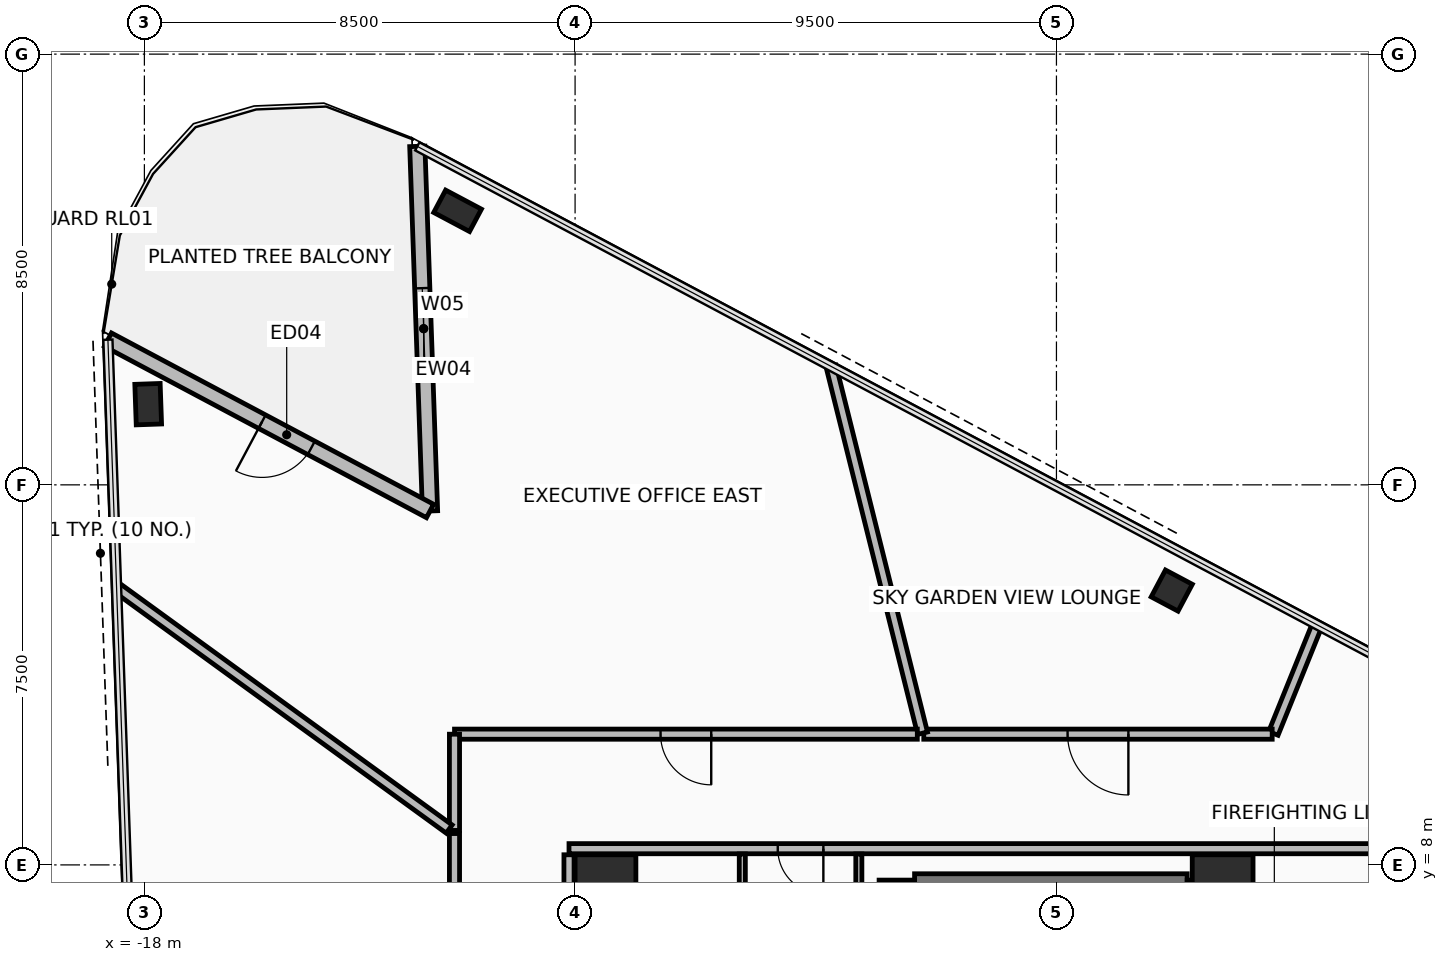
"""IFC4 building model, lengths in metres.
Left out: names, types, materials, properties, quantities, classifications, styles, units other than length and angle.
Written with IfcOpenShell. Run it as: python <this file> out.ifc"""

import sys

from ifc_helpers import new_model, si_unit, direction, frame, frame_2d, origin, origin_2d, place, context, subcontext, project, spatial, rectangle, hollow_rectangle, extrude, element, fill, save


model = new_model("IFC4")
c1 = context("Model", 3, precision=1e-05, world=origin(), true_north=direction((0.0, 1.0)))
c2 = subcontext(c1, "Body", "Model", "MODEL_VIEW")
j1 = project(units=[si_unit("LENGTHUNIT", "METRE"), si_unit("PLANEANGLEUNIT", "RADIAN")], contexts=[c1])
p1 = place(None, origin())
s1 = spatial("IfcSite", under=j1, at=p1, CompositionType="ELEMENT")
p2 = place(p1, origin())
s2 = spatial("IfcBuilding", under=s1, at=p2, CompositionType="ELEMENT")
p3 = place(p2, frame((0.0, 0.0, 138.8)))
s3 = spatial("IfcBuildingStorey", under=s2, at=p3, CompositionType="ELEMENT", Elevation=138.8)
for number, where, z_axis, x_axis in (
    (1, (3.28, 7.6, 0.0), (0.0, 0.0, 1.0), (1.0, 0.0, 0.0)),
    (2, (-8.9, 7.6, 0.0), (0.0, 0.0, 1.0), (1.0, 0.0, 0.0)),
):
    element("IfcColumn", number, at=place(p3, frame(where, z_axis=z_axis, x_axis=x_axis)), inside=s3, PredefinedType="COLUMN", context=c2, shape_type="SweptSolid", body=[
        extrude(rectangle(XDim=1.2, YDim=1.2, at=origin_2d()), origin(), (0.0, 0.0, 1.0), 3.6),
    ])
p4 = place(p3, frame((-17.925, 17.092, -0.19), z_axis=(0.0, 0.0, 1.0), x_axis=(-0.034899496703, 0.999390827019, 0.0)))
e3 = element("IfcColumn", 3, at=p4, inside=s3, PredefinedType="COLUMN", context=c2, shape_type="SweptSolid", body=[
    extrude(hollow_rectangle(XDim=0.5, YDim=0.8, WallThickness=0.04, at=origin_2d()), origin(), (0.0, 0.0, 1.0), 3.79),
])
p5 = place(p3, frame((2.276, 13.414, 0.0), z_axis=(0.0, 0.0, 1.0), x_axis=(-0.88294841224, 0.469470021751, 0.0)))
e4 = element("IfcColumn", 4, at=p5, inside=s3, PredefinedType="COLUMN", context=c2, shape_type="SweptSolid", body=[
    extrude(hollow_rectangle(XDim=0.6, YDim=0.6, WallThickness=0.036, at=origin_2d()), origin(), (0.0, 0.0, 1.0), 3.6),
])
p6 = place(p3, frame((-11.819, 20.908, 0.0), z_axis=(0.0, 0.0, 1.0), x_axis=(-0.88294841224, 0.469470021751, 0.0)))
e5 = element("IfcColumn", 5, at=p6, inside=s3, PredefinedType="COLUMN", context=c2, shape_type="SweptSolid", body=[
    extrude(hollow_rectangle(XDim=0.5, YDim=0.8, WallThickness=0.04, at=origin_2d()), origin(), (0.0, 0.0, 1.0), 3.6),
])
p7 = place(p3, frame((-12.614, 22.18, 0.0), z_axis=(0.0, 0.0, 1.0), x_axis=(0.034925918675, -0.999389903994, 0.0)))
e6 = element("IfcWall", 6, at=p7, inside=s3, PredefinedType="STANDARD", context=c2, shape_type="SweptSolid", body=[
    extrude(rectangle(XDim=7.2, YDim=0.3, at=frame_2d((3.6, 0.0))), origin(), (0.0, 0.0, 1.0), 2.705),
])
p8 = place(p7, frame((2.8, 0.0, 0.325)))
e7 = element("IfcOpeningElement", 7, at=p8, cuts=e6, PredefinedType="OPENING", context=c2, shape_type="SweptSolid", body=[
    extrude(rectangle(XDim=1.6, YDim=2.2, at=frame_2d((0.8, 1.1))), frame((0.0, 0.16, 0.0), z_axis=(0.0, -1.0, 0.0), x_axis=(1.0, 0.0, 0.0)), (0.0, 0.0, 1.0), 0.32),
])
p9 = place(p3, frame((-12.363, 14.984, 0.0), z_axis=(0.0, 0.0, 1.0), x_axis=(-0.882950149473, 0.469466754463, 0.0)))
e8 = element("IfcWall", 8, at=p9, inside=s3, PredefinedType="STANDARD", context=c2, shape_type="SweptSolid", body=[
    extrude(rectangle(XDim=7.2, YDim=0.3, at=frame_2d((3.6, 0.0))), origin(), (0.0, 0.0, 1.0), 2.705),
])
p10 = place(p9, frame((2.654, 0.0, 0.0)))
e9 = element("IfcOpeningElement", 9, at=p10, cuts=e8, PredefinedType="OPENING", context=c2, shape_type="SweptSolid", body=[
    extrude(rectangle(XDim=1.1, YDim=2.2, at=frame_2d((0.55, 1.1))), frame((0.0, 0.16, 0.0), z_axis=(0.0, -1.0, 0.0), x_axis=(1.0, 0.0, 0.0)), (0.0, 0.0, 1.0), 0.32),
])
p11 = place(p3, frame((-2.8, 7.6, 0.0), z_axis=(0.0, 0.0, 1.0), x_axis=(1.0, 0.0, 0.0)))
e10 = element("IfcWall", 10, at=p11, inside=s3, PredefinedType="SHEAR", context=c2, shape_type="SweptSolid", body=[
    extrude(rectangle(XDim=5.38, YDim=0.45, at=frame_2d((2.69, 0.0))), origin(), (0.0, 0.0, 1.0), 3.41),
])
p12 = place(p3, frame((9.62, 8.32, 0.0), z_axis=(0.0, 0.0, 1.0), x_axis=(-1.0, 0.0, 0.0)))
e11 = element("IfcWall", 11, at=p12, inside=s3, PredefinedType="PARTITIONING", context=c2, shape_type="SweptSolid", body=[
    extrude(rectangle(XDim=19.24, YDim=0.2, at=frame_2d((9.62, 0.0))), origin(), (0.0, 0.0, 1.0), 2.755),
])
p13 = place(p12, frame((14.22, 0.0, 0.0)))
e12 = element("IfcOpeningElement", 12, at=p13, cuts=e11, PredefinedType="OPENING", context=c2, shape_type="SweptSolid", body=[
    extrude(rectangle(XDim=0.9, YDim=2.1, at=frame_2d((0.45, 1.05))), frame((0.0, 0.11, 0.0), z_axis=(0.0, -1.0, 0.0), x_axis=(1.0, 0.0, 0.0)), (0.0, 0.0, 1.0), 0.22),
])
p14 = place(p3, frame((-9.62, 8.2, 0.0), z_axis=(0.0, 0.0, 1.0), x_axis=(0.0, -1.0, 0.0)))
e13 = element("IfcWall", 13, at=p14, inside=s3, PredefinedType="PARTITIONING", context=c2, shape_type="SweptSolid", body=[
    extrude(rectangle(XDim=16.4, YDim=0.2, at=frame_2d((8.2, 0.0))), origin(), (0.0, 0.0, 1.0), 2.855),
])
p15 = place(p14, frame((12.65, 0.0, 0.0)))
e14 = element("IfcOpeningElement", 14, at=p15, cuts=e13, PredefinedType="OPENING", context=c2, shape_type="SweptSolid", body=[
    extrude(rectangle(XDim=1.1, YDim=2.15, at=frame_2d((0.55, 1.075))), frame((0.0, 0.11, 0.0), z_axis=(0.0, -1.0, 0.0), x_axis=(1.0, 0.0, 0.0)), (0.0, 0.0, 1.0), 0.22),
])
for number, where, z_axis, x_axis in (
    (15, (-3.5, 7.6, 0.0), (0.0, 0.0, 1.0), (1.0, 0.0, 0.0)),
    (16, (2.58, 7.6, 0.0), (0.0, 0.0, 1.0), (1.0, 0.0, 0.0)),
):
    element("IfcWall", number, at=place(p3, frame(where, z_axis=z_axis, x_axis=x_axis)), inside=s3, PredefinedType="PARTITIONING", context=c2, shape_type="SweptSolid", body=[
        extrude(rectangle(XDim=0.7, YDim=0.2, at=frame_2d((0.35, 0.0))), origin(), (0.0, 0.0, 1.0), 2.605),
    ])
for number, where, z_axis, x_axis in (
    (17, (-3.9, 5.465, 0.0), (0.0, 0.0, 1.0), (0.0, 1.0, 0.0)),
    (18, (-6.2, 8.215, 0.0), (0.0, 0.0, 1.0), (0.0, -1.0, 0.0)),
):
    element("IfcWall", number, at=place(p3, frame(where, z_axis=z_axis, x_axis=x_axis)), inside=s3, PredefinedType="PARTITIONING", context=c2, shape_type="SweptSolid", body=[
        extrude(rectangle(XDim=2.75, YDim=0.12, at=frame_2d((1.375, 0.0))), origin(), (0.0, 0.0, 1.0), 2.605),
    ])
p16 = place(p3, frame((5.138, 12.716, 0.0), z_axis=(0.0, 0.0, 1.0), x_axis=(-0.374646634577, -0.927167675882, 0.0)))
e19 = element("IfcWall", 19, at=p16, inside=s3, PredefinedType="PARTITIONING", context=c2, shape_type="SweptSolid", body=[
    extrude(rectangle(XDim=2.287, YDim=0.2, at=frame_2d((1.143, 0.0))), origin(), (0.0, 0.0, 1.0), 2.705),
])
p17 = place(p3, frame((4.258, 10.58, 0.0), z_axis=(0.0, 0.0, 1.0), x_axis=(-1.0, 0.0, 0.0)))
e20 = element("IfcWall", 20, at=p17, inside=s3, PredefinedType="PARTITIONING", context=c2, shape_type="SweptSolid", body=[
    extrude(rectangle(XDim=6.876, YDim=0.2, at=frame_2d((3.438, 0.0))), origin(), (0.0, 0.0, 1.0), 2.855),
])
p18 = place(p17, frame((2.838, 0.0, 0.0)))
e21 = element("IfcOpeningElement", 21, at=p18, cuts=e20, PredefinedType="OPENING", context=c2, shape_type="SweptSolid", body=[
    extrude(rectangle(XDim=1.2, YDim=2.15, at=frame_2d((0.6, 1.075))), frame((0.0, 0.11, 0.0), z_axis=(0.0, -1.0, 0.0), x_axis=(1.0, 0.0, 0.0)), (0.0, 0.0, 1.0), 0.22),
])
p19 = place(p3, frame((-2.643, 10.599, 0.0), z_axis=(0.0, 0.0, 1.0), x_axis=(-0.241942663227, 0.970290548089, 0.0)))
e22 = element("IfcWall", 22, at=p19, inside=s3, PredefinedType="PARTITIONING", context=c2, shape_type="SweptSolid", body=[
    extrude(rectangle(XDim=7.46, YDim=0.2, at=frame_2d((3.73, 0.0))), origin(), (0.0, 0.0, 1.0), 2.705),
])
p20 = place(p3, frame((-2.746, 10.58, 0.0), z_axis=(0.0, 0.0, 1.0), x_axis=(-1.0, 0.0, 0.0)))
e23 = element("IfcWall", 23, at=p20, inside=s3, PredefinedType="PARTITIONING", context=c2, shape_type="SweptSolid", body=[
    extrude(rectangle(XDim=9.133, YDim=0.2, at=frame_2d((4.567, 0.0))), origin(), (0.0, 0.0, 1.0), 2.755),
])
p21 = place(p20, frame((4.067, 0.0, 0.0)))
e24 = element("IfcOpeningElement", 24, at=p21, cuts=e23, PredefinedType="OPENING", context=c2, shape_type="SweptSolid", body=[
    extrude(rectangle(XDim=1.0, YDim=2.15, at=frame_2d((0.5, 1.075))), frame((0.0, 0.11, 0.0), z_axis=(0.0, -1.0, 0.0), x_axis=(1.0, 0.0, 0.0)), (0.0, 0.0, 1.0), 0.22),
])
p22 = place(p3, frame((-11.88, 10.579, 0.0), z_axis=(0.0, 0.0, 1.0), x_axis=(0.0, -1.0, 0.0)))
e25 = element("IfcWall", 25, at=p22, inside=s3, PredefinedType="PARTITIONING", context=c2, shape_type="SweptSolid", body=[
    extrude(rectangle(XDim=1.899, YDim=0.2, at=frame_2d((0.949, 0.0))), origin(), (0.0, 0.0, 1.0), 2.855),
])
p23 = place(p3, frame((-11.985, 8.708, 0.0), z_axis=(0.0, 0.0, 1.0), x_axis=(-0.80901356524, 0.587789972063, 0.0)))
e26 = element("IfcWall", 26, at=p23, inside=s3, PredefinedType="PARTITIONING", context=c2, shape_type="SweptSolid", body=[
    extrude(rectangle(XDim=8.102, YDim=0.2, at=frame_2d((4.051, 0.0))), origin(), (0.0, 0.0, 1.0), 2.705),
])
p24 = place(p3, frame((-11.88, 8.619, 0.0), z_axis=(0.0, 0.0, 1.0), x_axis=(0.0, -1.0, 0.0)))
e27 = element("IfcWall", 27, at=p24, inside=s3, PredefinedType="PARTITIONING", context=c2, shape_type="SweptSolid", body=[
    extrude(rectangle(XDim=10.267, YDim=0.2, at=frame_2d((5.133, 0.0))), origin(), (0.0, 0.0, 1.0), 2.855),
])
p25 = place(p24, frame((4.633, 0.0, 0.0)))
e28 = element("IfcOpeningElement", 28, at=p25, cuts=e27, PredefinedType="OPENING", context=c2, shape_type="SweptSolid", body=[
    extrude(rectangle(XDim=1.0, YDim=2.15, at=frame_2d((0.5, 1.075))), frame((0.0, 0.11, 0.0), z_axis=(0.0, -1.0, 0.0), x_axis=(1.0, 0.0, 0.0)), (0.0, 0.0, 1.0), 0.22),
])
p26 = place(p10, frame((1.1, 0.0, 0.0), z_axis=(0.0, 0.0, 1.0), x_axis=(-1.0, 0.0, 0.0)))
e29 = element("IfcDoor", 29, at=p26, inside=s3, OperationType="SINGLE_SWING_LEFT", PredefinedType="DOOR", context=c2, shape_type="SweptSolid", body=[
    extrude(rectangle(XDim=1.1, YDim=2.2, at=frame_2d((0.55, 1.1))), frame((0.0, 0.025, 0.0), z_axis=(0.0, -1.0, 0.0), x_axis=(1.0, 0.0, 0.0)), (0.0, 0.0, 1.0), 0.05),
])
fill(e9, e29)
p27 = place(p8, origin())
e30 = element("IfcWindow", 30, at=p27, inside=s3, PartitioningType="SINGLE_PANEL", PredefinedType="WINDOW", context=c2, shape_type="SweptSolid", body=[
    extrude(rectangle(XDim=1.6, YDim=2.2, at=frame_2d((0.8, 1.1))), frame((0.0, 0.03, 0.0), z_axis=(0.0, -1.0, 0.0), x_axis=(1.0, 0.0, 0.0)), (0.0, 0.0, 1.0), 0.06),
])
fill(e7, e30)
p28 = place(p13, origin())
e31 = element("IfcDoor", 31, at=p28, inside=s3, OperationType="SINGLE_SWING_LEFT", PredefinedType="DOOR", context=c2, shape_type="SweptSolid", body=[
    extrude(rectangle(XDim=0.9, YDim=2.1, at=frame_2d((0.45, 1.05))), frame((0.0, 0.025, 0.0), z_axis=(0.0, -1.0, 0.0), x_axis=(1.0, 0.0, 0.0)), (0.0, 0.0, 1.0), 0.05),
])
fill(e12, e31)
p29 = place(p18, origin())
e32 = element("IfcDoor", 32, at=p29, inside=s3, OperationType="SINGLE_SWING_LEFT", PredefinedType="DOOR", context=c2, shape_type="SweptSolid", body=[
    extrude(rectangle(XDim=1.2, YDim=2.15, at=frame_2d((0.6, 1.075))), frame((0.0, 0.025, 0.0), z_axis=(0.0, -1.0, 0.0), x_axis=(1.0, 0.0, 0.0)), (0.0, 0.0, 1.0), 0.05),
])
fill(e21, e32)
p30 = place(p21, origin())
e33 = element("IfcDoor", 33, at=p30, inside=s3, OperationType="SINGLE_SWING_RIGHT", PredefinedType="DOOR", context=c2, shape_type="SweptSolid", body=[
    extrude(rectangle(XDim=1.0, YDim=2.15, at=frame_2d((0.5, 1.075))), frame((0.0, 0.025, 0.0), z_axis=(0.0, -1.0, 0.0), x_axis=(1.0, 0.0, 0.0)), (0.0, 0.0, 1.0), 0.05),
])
fill(e24, e33)
save(model, sys.argv[1])
